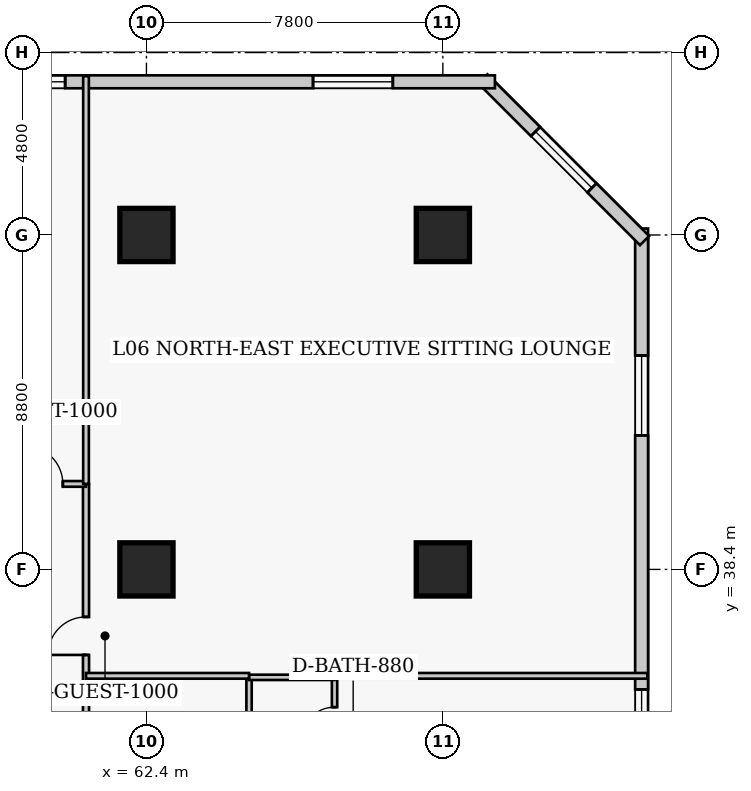
"""IFC4 building model, lengths in metres.
Left out: names, types, materials, properties, quantities, classifications, styles, units other than length and angle.
Written with IfcOpenShell. Run it as: python <this file> out.ifc"""

import sys

from ifc_helpers import new_model, si_unit, direction, frame, frame_2d, origin, origin_2d, place, context, subcontext, project, spatial, rectangle, extrude, element, fill, save


model = new_model("IFC4")
c1 = context("Model", 3, precision=1e-05, world=origin(), true_north=direction((0.0, 1.0)))
c2 = subcontext(c1, "Body", "Model", "MODEL_VIEW")
j1 = project(units=[si_unit("LENGTHUNIT", "METRE"), si_unit("PLANEANGLEUNIT", "RADIAN")], contexts=[c1])
p1 = place(None, origin())
s1 = spatial("IfcSite", under=j1, at=p1, CompositionType="ELEMENT")
p2 = place(p1, origin())
s2 = spatial("IfcBuilding", under=s1, at=p2, CompositionType="ELEMENT")
p3 = place(p2, frame((0.0, 0.0, 29.8)))
s3 = spatial("IfcBuildingStorey", under=s2, at=p3, CompositionType="ELEMENT", Elevation=29.8)
for number, where, z_axis, x_axis in (
    (1, (62.4, 38.4, 0.0), (0.0, 0.0, 1.0), (1.0, 0.0, 0.0)),
    (2, (62.4, 47.2, 0.0), (0.0, 0.0, 1.0), (1.0, 0.0, 0.0)),
    (3, (70.2, 38.4, 0.0), (0.0, 0.0, 1.0), (1.0, 0.0, 0.0)),
    (4, (70.2, 47.2, 0.0), (0.0, 0.0, 1.0), (1.0, 0.0, 0.0)),
):
    element("IfcColumn", number, at=place(p3, frame(where, z_axis=z_axis, x_axis=x_axis)), inside=s3, PredefinedType="COLUMN", context=c2, shape_type="SweptSolid", body=[
        extrude(rectangle(XDim=1.4, YDim=1.4, at=origin_2d()), origin(), (0.0, 0.0, 1.0), 3.8),
    ])
p4 = place(p3, frame((75.43, 12.23, 0.0), z_axis=(0.0, 0.0, 1.0), x_axis=(0.0, 1.0, 0.0)))
e5 = element("IfcWall", 5, at=p4, inside=s3, PredefinedType="SOLIDWALL", context=c2, shape_type="SweptSolid", body=[
    extrude(rectangle(XDim=35.14, YDim=0.34, at=frame_2d((17.57, 0.0))), origin(), (0.0, 0.0, 1.0), 3.54),
])
p5 = place(p4, frame((3.343, 0.0, 0.85)))
e6 = element("IfcOpeningElement", 6, at=p5, cuts=e5, PredefinedType="OPENING", context=c2, shape_type="SweptSolid", body=[
    extrude(rectangle(XDim=2.1, YDim=1.85, at=frame_2d((1.05, 0.925))), frame((0.0, 0.18, 0.0), z_axis=(0.0, -1.0, 0.0), x_axis=(1.0, 0.0, 0.0)), (0.0, 0.0, 1.0), 0.36),
])
p6 = place(p4, frame((12.127, 0.0, 0.85)))
e7 = element("IfcOpeningElement", 7, at=p6, cuts=e5, PredefinedType="OPENING", context=c2, shape_type="SweptSolid", body=[
    extrude(rectangle(XDim=2.1, YDim=1.85, at=frame_2d((1.05, 0.925))), frame((0.0, 0.18, 0.0), z_axis=(0.0, -1.0, 0.0), x_axis=(1.0, 0.0, 0.0)), (0.0, 0.0, 1.0), 0.36),
])
p7 = place(p4, frame((20.913, 0.0, 0.85)))
e8 = element("IfcOpeningElement", 8, at=p7, cuts=e5, PredefinedType="OPENING", context=c2, shape_type="SweptSolid", body=[
    extrude(rectangle(XDim=2.1, YDim=1.85, at=frame_2d((1.05, 0.925))), frame((0.0, 0.18, 0.0), z_axis=(0.0, -1.0, 0.0), x_axis=(1.0, 0.0, 0.0)), (0.0, 0.0, 1.0), 0.36),
])
p8 = place(p4, frame((29.698, 0.0, 0.85)))
e9 = element("IfcOpeningElement", 9, at=p8, cuts=e5, PredefinedType="OPENING", context=c2, shape_type="SweptSolid", body=[
    extrude(rectangle(XDim=2.1, YDim=1.85, at=frame_2d((1.05, 0.925))), frame((0.0, 0.18, 0.0), z_axis=(0.0, -1.0, 0.0), x_axis=(1.0, 0.0, 0.0)), (0.0, 0.0, 1.0), 0.36),
])
p9 = place(p3, frame((75.508, 47.052, 0.0), z_axis=(0.0, 0.0, 1.0), x_axis=(-0.707106781187, 0.707106781187, 0.0)))
e10 = element("IfcWall", 10, at=p9, inside=s3, PredefinedType="SOLIDWALL", context=c2, shape_type="SweptSolid", body=[
    extrude(rectangle(XDim=6.02, YDim=0.34, at=frame_2d((3.01, 0.0))), origin(), (0.0, 0.0, 1.0), 3.54),
])
p10 = place(p9, frame((1.96, 0.0, 0.85)))
e11 = element("IfcOpeningElement", 11, at=p10, cuts=e10, PredefinedType="OPENING", context=c2, shape_type="SweptSolid", body=[
    extrude(rectangle(XDim=2.1, YDim=1.85, at=frame_2d((1.05, 0.925))), frame((0.0, 0.18, 0.0), z_axis=(0.0, -1.0, 0.0), x_axis=(1.0, 0.0, 0.0)), (0.0, 0.0, 1.0), 0.36),
])
p11 = place(p3, frame((71.57, 51.23, 0.0), z_axis=(0.0, 0.0, 1.0), x_axis=(-1.0, 0.0, 0.0)))
e12 = element("IfcWall", 12, at=p11, inside=s3, PredefinedType="SOLIDWALL", context=c2, shape_type="SweptSolid", body=[
    extrude(rectangle(XDim=29.89, YDim=0.34, at=frame_2d((14.945, 0.0))), origin(), (0.0, 0.0, 1.0), 3.54),
])
p12 = place(p11, frame((2.686, 0.0, 0.85)))
e13 = element("IfcOpeningElement", 13, at=p12, cuts=e12, PredefinedType="OPENING", context=c2, shape_type="SweptSolid", body=[
    extrude(rectangle(XDim=2.1, YDim=1.85, at=frame_2d((1.05, 0.925))), frame((0.0, 0.18, 0.0), z_axis=(0.0, -1.0, 0.0), x_axis=(1.0, 0.0, 0.0)), (0.0, 0.0, 1.0), 0.36),
])
p13 = place(p11, frame((11.309, 0.0, 0.85)))
e14 = element("IfcOpeningElement", 14, at=p13, cuts=e12, PredefinedType="OPENING", context=c2, shape_type="SweptSolid", body=[
    extrude(rectangle(XDim=2.1, YDim=1.85, at=frame_2d((1.05, 0.925))), frame((0.0, 0.18, 0.0), z_axis=(0.0, -1.0, 0.0), x_axis=(1.0, 0.0, 0.0)), (0.0, 0.0, 1.0), 0.36),
])
p14 = place(p11, frame((17.631, 0.0, 0.85)))
e15 = element("IfcOpeningElement", 15, at=p14, cuts=e12, PredefinedType="OPENING", context=c2, shape_type="SweptSolid", body=[
    extrude(rectangle(XDim=2.1, YDim=1.85, at=frame_2d((1.05, 0.925))), frame((0.0, 0.18, 0.0), z_axis=(0.0, -1.0, 0.0), x_axis=(1.0, 0.0, 0.0)), (0.0, 0.0, 1.0), 0.36),
])
p15 = place(p11, frame((25.104, 0.0, 0.85)))
e16 = element("IfcOpeningElement", 16, at=p15, cuts=e12, PredefinedType="OPENING", context=c2, shape_type="SweptSolid", body=[
    extrude(rectangle(XDim=2.1, YDim=1.85, at=frame_2d((1.05, 0.925))), frame((0.0, 0.18, 0.0), z_axis=(0.0, -1.0, 0.0), x_axis=(1.0, 0.0, 0.0)), (0.0, 0.0, 1.0), 0.36),
])
p16 = place(p3, frame((60.81, 10.25, 0.0), z_axis=(0.0, 0.0, 1.0), x_axis=(0.0, 1.0, 0.0)))
e17 = element("IfcWall", 17, at=p16, inside=s3, PredefinedType="PARTITIONING", context=c2, shape_type="SweptSolid", body=[
    extrude(rectangle(XDim=30.4, YDim=0.16, at=frame_2d((15.2, 0.0))), origin(), (0.0, 0.0, 1.0), 3.54),
])
p17 = place(p16, frame((4.4, 0.0, 0.0)))
e18 = element("IfcOpeningElement", 18, at=p17, cuts=e17, PredefinedType="OPENING", context=c2, shape_type="SweptSolid", body=[
    extrude(rectangle(XDim=0.95, YDim=2.1, at=frame_2d((0.475, 1.05))), frame((0.0, 0.09, 0.0), z_axis=(0.0, -1.0, 0.0), x_axis=(1.0, 0.0, 0.0)), (0.0, 0.0, 1.0), 0.18),
])
p18 = place(p16, frame((13.175, 0.0, 0.0)))
e19 = element("IfcOpeningElement", 19, at=p18, cuts=e17, PredefinedType="OPENING", context=c2, shape_type="SweptSolid", body=[
    extrude(rectangle(XDim=0.95, YDim=2.1, at=frame_2d((0.475, 1.05))), frame((0.0, 0.09, 0.0), z_axis=(0.0, -1.0, 0.0), x_axis=(1.0, 0.0, 0.0)), (0.0, 0.0, 1.0), 0.18),
])
p19 = place(p16, frame((20.975, 0.0, 0.0)))
e20 = element("IfcOpeningElement", 20, at=p19, cuts=e17, PredefinedType="OPENING", context=c2, shape_type="SweptSolid", body=[
    extrude(rectangle(XDim=0.95, YDim=2.1, at=frame_2d((0.475, 1.05))), frame((0.0, 0.09, 0.0), z_axis=(0.0, -1.0, 0.0), x_axis=(1.0, 0.0, 0.0)), (0.0, 0.0, 1.0), 0.18),
])
p20 = place(p16, frame((25.9, 0.0, 0.0)))
e21 = element("IfcOpeningElement", 21, at=p20, cuts=e17, PredefinedType="OPENING", context=c2, shape_type="SweptSolid", body=[
    extrude(rectangle(XDim=1.0, YDim=2.15, at=frame_2d((0.5, 1.075))), frame((0.0, 0.09, 0.0), z_axis=(0.0, -1.0, 0.0), x_axis=(1.0, 0.0, 0.0)), (0.0, 0.0, 1.0), 0.18),
])
p21 = place(p3, frame((56.8, 40.65, 0.0), z_axis=(0.0, 0.0, 1.0), x_axis=(1.0, 0.0, 0.0)))
e22 = element("IfcWall", 22, at=p21, inside=s3, PredefinedType="PARTITIONING", context=c2, shape_type="SweptSolid", body=[
    extrude(rectangle(XDim=4.01, YDim=0.15, at=frame_2d((2.005, 0.0))), origin(), (0.0, 0.0, 1.0), 3.54),
])
p22 = place(p21, frame((2.4, 0.0, 0.0)))
e23 = element("IfcOpeningElement", 23, at=p22, cuts=e22, PredefinedType="OPENING", context=c2, shape_type="SweptSolid", body=[
    extrude(rectangle(XDim=1.0, YDim=2.15, at=frame_2d((0.5, 1.075))), frame((0.0, 0.085, 0.0), z_axis=(0.0, -1.0, 0.0), x_axis=(1.0, 0.0, 0.0)), (0.0, 0.0, 1.0), 0.17),
])
p23 = place(p3, frame((60.81, 40.65, 0.0), z_axis=(0.0, 0.0, 1.0), x_axis=(0.0, 1.0, 0.0)))
e24 = element("IfcWall", 24, at=p23, inside=s3, PredefinedType="PARTITIONING", context=c2, shape_type="SweptSolid", body=[
    extrude(rectangle(XDim=10.73, YDim=0.15, at=frame_2d((5.365, 0.0))), origin(), (0.0, 0.0, 1.0), 3.54),
])
p24 = place(p3, frame((65.1, 33.11, 0.0), z_axis=(0.0, 0.0, 1.0), x_axis=(0.0, 1.0, 0.0)))
e25 = element("IfcWall", 25, at=p24, inside=s3, PredefinedType="PLUMBINGWALL", context=c2, shape_type="SweptSolid", body=[
    extrude(rectangle(XDim=2.45, YDim=0.14, at=frame_2d((1.225, 0.0))), origin(), (0.0, 0.0, 1.0), 3.54),
])
p25 = place(p3, frame((67.35, 33.11, 0.0), z_axis=(0.0, 0.0, 1.0), x_axis=(0.0, 1.0, 0.0)))
e26 = element("IfcWall", 26, at=p25, inside=s3, PredefinedType="PLUMBINGWALL", context=c2, shape_type="SweptSolid", body=[
    extrude(rectangle(XDim=2.45, YDim=0.14, at=frame_2d((1.225, 0.0))), origin(), (0.0, 0.0, 1.0), 3.54),
])
p26 = place(p25, frame((0.785, 0.0, 0.0)))
e27 = element("IfcOpeningElement", 27, at=p26, cuts=e26, PredefinedType="OPENING", context=c2, shape_type="SweptSolid", body=[
    extrude(rectangle(XDim=0.88, YDim=2.05, at=frame_2d((0.44, 1.025))), frame((0.0, 0.08, 0.0), z_axis=(0.0, -1.0, 0.0), x_axis=(1.0, 0.0, 0.0)), (0.0, 0.0, 1.0), 0.16),
])
p27 = place(p3, frame((65.1, 35.56, 0.0), z_axis=(0.0, 0.0, 1.0), x_axis=(1.0, 0.0, 0.0)))
e28 = element("IfcWall", 28, at=p27, inside=s3, PredefinedType="PLUMBINGWALL", context=c2, shape_type="SweptSolid", body=[
    extrude(rectangle(XDim=2.25, YDim=0.14, at=frame_2d((1.125, 0.0))), origin(), (0.0, 0.0, 1.0), 3.54),
])
p28 = place(p3, frame((60.81, 35.6, 0.0), z_axis=(0.0, 0.0, 1.0), x_axis=(1.0, 0.0, 0.0)))
e29 = element("IfcWall", 29, at=p28, inside=s3, PredefinedType="PARTITIONING", context=c2, shape_type="SweptSolid", body=[
    extrude(rectangle(XDim=4.29, YDim=0.15, at=frame_2d((2.145, 0.0))), origin(), (0.0, 0.0, 1.0), 3.54),
])
p29 = place(p3, frame((67.35, 35.6, 0.0), z_axis=(0.0, 0.0, 1.0), x_axis=(1.0, 0.0, 0.0)))
e30 = element("IfcWall", 30, at=p29, inside=s3, PredefinedType="PARTITIONING", context=c2, shape_type="SweptSolid", body=[
    extrude(rectangle(XDim=8.23, YDim=0.15, at=frame_2d((4.115, 0.0))), origin(), (0.0, 0.0, 1.0), 3.54),
])
p30 = place(p7, origin())
e31 = element("IfcWindow", 31, at=p30, inside=s3, PartitioningType="SINGLE_PANEL", PredefinedType="WINDOW", context=c2, shape_type="SweptSolid", body=[
    extrude(rectangle(XDim=2.1, YDim=1.85, at=frame_2d((1.05, 0.925))), frame((0.0, 0.03, 0.0), z_axis=(0.0, -1.0, 0.0), x_axis=(1.0, 0.0, 0.0)), (0.0, 0.0, 1.0), 0.06),
])
fill(e8, e31)
p31 = place(p8, origin())
e32 = element("IfcWindow", 32, at=p31, inside=s3, PartitioningType="SINGLE_PANEL", PredefinedType="WINDOW", context=c2, shape_type="SweptSolid", body=[
    extrude(rectangle(XDim=2.1, YDim=1.85, at=frame_2d((1.05, 0.925))), frame((0.0, 0.03, 0.0), z_axis=(0.0, -1.0, 0.0), x_axis=(1.0, 0.0, 0.0)), (0.0, 0.0, 1.0), 0.06),
])
fill(e9, e32)
p32 = place(p10, origin())
e33 = element("IfcWindow", 33, at=p32, inside=s3, PartitioningType="SINGLE_PANEL", PredefinedType="WINDOW", context=c2, shape_type="SweptSolid", body=[
    extrude(rectangle(XDim=2.1, YDim=1.85, at=frame_2d((1.05, 0.925))), frame((0.0, 0.03, 0.0), z_axis=(0.0, -1.0, 0.0), x_axis=(1.0, 0.0, 0.0)), (0.0, 0.0, 1.0), 0.06),
])
fill(e11, e33)
p33 = place(p12, origin())
e34 = element("IfcWindow", 34, at=p33, inside=s3, PartitioningType="SINGLE_PANEL", PredefinedType="WINDOW", context=c2, shape_type="SweptSolid", body=[
    extrude(rectangle(XDim=2.1, YDim=1.85, at=frame_2d((1.05, 0.925))), frame((0.0, 0.03, 0.0), z_axis=(0.0, -1.0, 0.0), x_axis=(1.0, 0.0, 0.0)), (0.0, 0.0, 1.0), 0.06),
])
fill(e13, e34)
p34 = place(p13, origin())
e35 = element("IfcWindow", 35, at=p34, inside=s3, PartitioningType="SINGLE_PANEL", PredefinedType="WINDOW", context=c2, shape_type="SweptSolid", body=[
    extrude(rectangle(XDim=2.1, YDim=1.85, at=frame_2d((1.05, 0.925))), frame((0.0, 0.03, 0.0), z_axis=(0.0, -1.0, 0.0), x_axis=(1.0, 0.0, 0.0)), (0.0, 0.0, 1.0), 0.06),
])
fill(e14, e35)
p35 = place(p22, origin())
e36 = element("IfcDoor", 36, at=p35, inside=s3, OperationType="SINGLE_SWING_LEFT", PredefinedType="DOOR", context=c2, shape_type="SweptSolid", body=[
    extrude(rectangle(XDim=1.0, YDim=2.15, at=frame_2d((0.5, 1.075))), frame((0.0, 0.025, 0.0), z_axis=(0.0, -1.0, 0.0), x_axis=(1.0, 0.0, 0.0)), (0.0, 0.0, 1.0), 0.05),
])
fill(e23, e36)
p36 = place(p26, origin())
e37 = element("IfcDoor", 37, at=p36, inside=s3, OperationType="SINGLE_SWING_LEFT", PredefinedType="DOOR", context=c2, shape_type="SweptSolid", body=[
    extrude(rectangle(XDim=0.88, YDim=2.05, at=frame_2d((0.44, 1.025))), frame((0.0, 0.025, 0.0), z_axis=(0.0, -1.0, 0.0), x_axis=(1.0, 0.0, 0.0)), (0.0, 0.0, 1.0), 0.05),
])
fill(e27, e37)
p37 = place(p20, origin())
e38 = element("IfcDoor", 38, at=p37, inside=s3, OperationType="SINGLE_SWING_LEFT", PredefinedType="DOOR", context=c2, shape_type="SweptSolid", body=[
    extrude(rectangle(XDim=1.0, YDim=2.15, at=frame_2d((0.5, 1.075))), frame((0.0, 0.025, 0.0), z_axis=(0.0, -1.0, 0.0), x_axis=(1.0, 0.0, 0.0)), (0.0, 0.0, 1.0), 0.05),
])
fill(e21, e38)
save(model, sys.argv[1])
